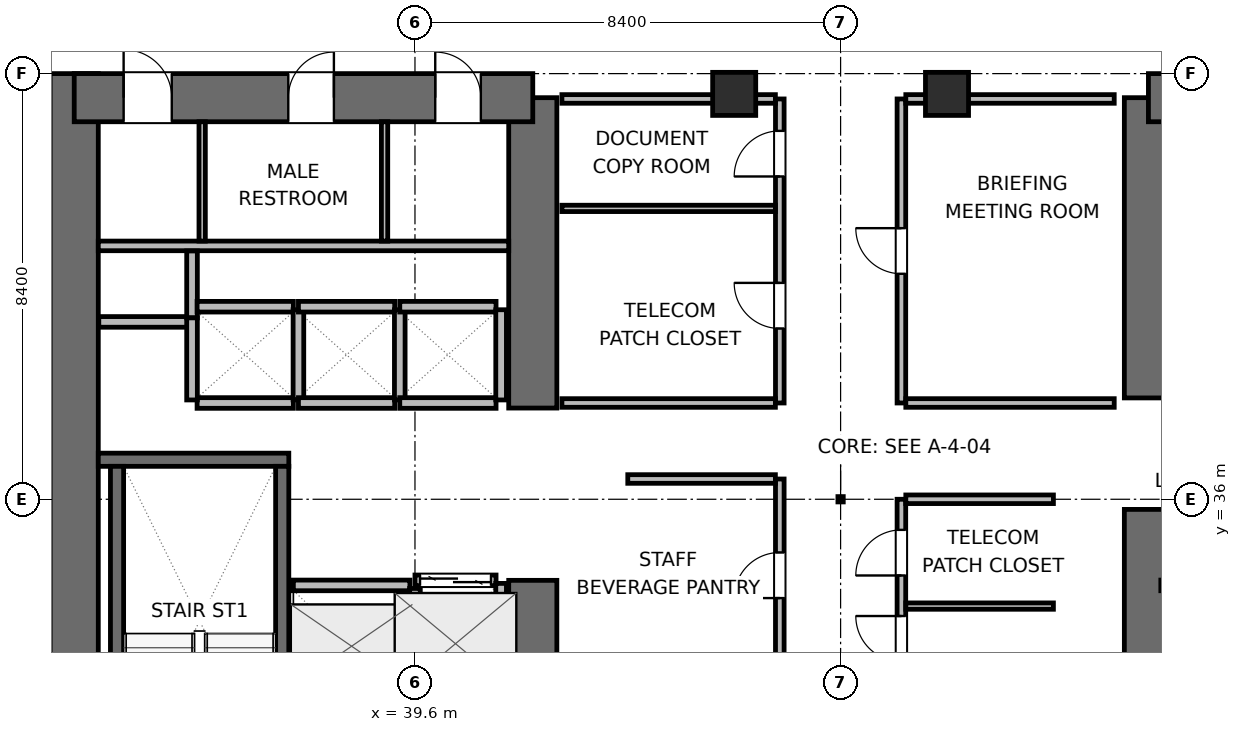
"""IFC4 building model, lengths in metres.
Left out: names, types, materials, properties, quantities, classifications, styles, units other than length and angle.
Written with IfcOpenShell. Run it as: python <this file> out.ifc"""

import sys

from ifc_helpers import new_model, si_unit, direction, frame, frame_2d, origin, origin_2d, place, context, subcontext, project, spatial, rectangle, extrude, element, fill, save


model = new_model("IFC4")
c1 = context("Model", 3, precision=1e-05, world=origin(), true_north=direction((0.0, 1.0)))
c2 = subcontext(c1, "Body", "Model", "MODEL_VIEW")
j1 = project(units=[si_unit("LENGTHUNIT", "METRE"), si_unit("PLANEANGLEUNIT", "RADIAN")], contexts=[c1])
p1 = place(None, origin())
s1 = spatial("IfcSite", under=j1, at=p1, CompositionType="ELEMENT")
p2 = place(p1, origin())
s2 = spatial("IfcBuilding", under=s1, at=p2, CompositionType="ELEMENT")
p3 = place(p2, frame((0.0, 0.0, 25.5)))
s3 = spatial("IfcBuildingStorey", under=s2, at=p3, CompositionType="ELEMENT", Elevation=25.5)
p4 = place(p3, frame((32.875, 27.6, 0.0), z_axis=(0.0, 0.0, 1.0), x_axis=(0.0, 1.0, 0.0)))
e1 = element("IfcWall", 1, at=p4, inside=s3, PredefinedType="SHEAR", context=c2, shape_type="SweptSolid", body=[
    extrude(rectangle(XDim=16.8, YDim=0.95, at=frame_2d((8.4, 0.0))), origin(), (0.0, 0.0, 1.0), 3.9),
])
p5 = place(p3, frame((41.925, 28.075, 0.0), z_axis=(0.0, 0.0, 1.0), x_axis=(0.0, 1.0, 0.0)))
e2 = element("IfcWall", 2, at=p5, inside=s3, PredefinedType="SHEAR", context=c2, shape_type="SweptSolid", body=[
    extrude(rectangle(XDim=6.325, YDim=0.95, at=frame_2d((3.163, 0.0))), origin(), (0.0, 0.0, 1.0), 3.9),
])
p6 = place(p3, frame((41.925, 37.8, 0.0), z_axis=(0.0, 0.0, 1.0), x_axis=(0.0, 1.0, 0.0)))
e3 = element("IfcWall", 3, at=p6, inside=s3, PredefinedType="SHEAR", context=c2, shape_type="SweptSolid", body=[
    extrude(rectangle(XDim=6.125, YDim=0.95, at=frame_2d((3.062, 0.0))), origin(), (0.0, 0.0, 1.0), 3.9),
])
p7 = place(p3, frame((32.875, 43.925, 0.0), z_axis=(0.0, 0.0, 1.0), x_axis=(1.0, 0.0, 0.0)))
e4 = element("IfcWall", 4, at=p7, inside=s3, PredefinedType="SHEAR", context=c2, shape_type="SweptSolid", body=[
    extrude(rectangle(XDim=9.05, YDim=0.95, at=frame_2d((4.525, 0.0))), origin(), (0.0, 0.0, 1.0), 3.9),
])
p8 = place(p7, frame((0.975, 0.0, 0.0)))
e5 = element("IfcOpeningElement", 5, at=p8, cuts=e4, PredefinedType="OPENING", context=c2, shape_type="SweptSolid", body=[
    extrude(rectangle(XDim=0.95, YDim=2.04, at=frame_2d((0.475, 1.02))), frame((0.0, 0.485, 0.0), z_axis=(0.0, -1.0, 0.0), x_axis=(1.0, 0.0, 0.0)), (0.0, 0.0, 1.0), 0.97),
])
p9 = place(p7, frame((4.225, 0.0, 0.0)))
e6 = element("IfcOpeningElement", 6, at=p9, cuts=e4, PredefinedType="OPENING", context=c2, shape_type="SweptSolid", body=[
    extrude(rectangle(XDim=0.9, YDim=2.02, at=frame_2d((0.45, 1.01))), frame((0.0, 0.485, 0.0), z_axis=(0.0, -1.0, 0.0), x_axis=(1.0, 0.0, 0.0)), (0.0, 0.0, 1.0), 0.97),
])
p10 = place(p7, frame((7.125, 0.0, 0.0)))
e7 = element("IfcOpeningElement", 7, at=p10, cuts=e4, PredefinedType="OPENING", context=c2, shape_type="SweptSolid", body=[
    extrude(rectangle(XDim=0.9, YDim=2.02, at=frame_2d((0.45, 1.01))), frame((0.0, 0.485, 0.0), z_axis=(0.0, -1.0, 0.0), x_axis=(1.0, 0.0, 0.0)), (0.0, 0.0, 1.0), 0.97),
])
p11 = place(p3, frame((54.075, 28.075, 0.0), z_axis=(0.0, 0.0, 1.0), x_axis=(0.0, 1.0, 0.0)))
e8 = element("IfcWall", 8, at=p11, inside=s3, PredefinedType="SHEAR", context=c2, shape_type="SweptSolid", body=[
    extrude(rectangle(XDim=7.725, YDim=0.95, at=frame_2d((3.863, 0.0))), origin(), (0.0, 0.0, 1.0), 3.9),
])
p12 = place(p3, frame((54.075, 38.0, 0.0), z_axis=(0.0, 0.0, 1.0), x_axis=(0.0, 1.0, 0.0)))
e9 = element("IfcWall", 9, at=p12, inside=s3, PredefinedType="SHEAR", context=c2, shape_type="SweptSolid", body=[
    extrude(rectangle(XDim=5.925, YDim=0.95, at=frame_2d((2.962, 0.0))), origin(), (0.0, 0.0, 1.0), 3.9),
])
p13 = place(p3, frame((54.075, 43.925, 0.0), z_axis=(0.0, 0.0, 1.0), x_axis=(1.0, 0.0, 0.0)))
e10 = element("IfcWall", 10, at=p13, inside=s3, PredefinedType="SHEAR", context=c2, shape_type="SweptSolid", body=[
    extrude(rectangle(XDim=9.05, YDim=0.95, at=frame_2d((4.525, 0.0))), origin(), (0.0, 0.0, 1.0), 3.9),
])
p14 = place(p3, frame((33.35, 36.78, 0.0), z_axis=(0.0, 0.0, 1.0), x_axis=(1.0, 0.0, 0.0)))
e11 = element("IfcWall", 11, at=p14, inside=s3, PredefinedType="SHEAR", context=c2, shape_type="SweptSolid", body=[
    extrude(rectangle(XDim=3.76, YDim=0.26, at=frame_2d((1.88, 0.0))), origin(), (0.0, 0.0, 1.0), 3.9),
])
p15 = place(p3, frame((33.72, 29.05, 0.0), z_axis=(0.0, 0.0, 1.0), x_axis=(0.0, 1.0, 0.0)))
e12 = element("IfcWall", 12, at=p15, inside=s3, PredefinedType="SHEAR", context=c2, shape_type="SweptSolid", body=[
    extrude(rectangle(XDim=7.6, YDim=0.26, at=frame_2d((3.8, 0.0))), origin(), (0.0, 0.0, 1.0), 3.9),
])
p16 = place(p3, frame((36.98, 29.05, 0.0), z_axis=(0.0, 0.0, 1.0), x_axis=(0.0, 1.0, 0.0)))
e13 = element("IfcWall", 13, at=p16, inside=s3, PredefinedType="SHEAR", context=c2, shape_type="SweptSolid", body=[
    extrude(rectangle(XDim=7.6, YDim=0.26, at=frame_2d((3.8, 0.0))), origin(), (0.0, 0.0, 1.0), 3.9),
])
p17 = place(p16, frame((0.3, 0.0, 0.0)))
e14 = element("IfcOpeningElement", 14, at=p17, cuts=e13, PredefinedType="OPENING", context=c2, shape_type="SweptSolid", body=[
    extrude(rectangle(XDim=1.0, YDim=2.04, at=frame_2d((0.5, 1.02))), frame((0.0, 0.14, 0.0), z_axis=(0.0, -1.0, 0.0), x_axis=(1.0, 0.0, 0.0)), (0.0, 0.0, 1.0), 0.28),
])
for number, where, z_axis, x_axis in (
    (15, (45.9, 44.0, 0.0), (0.0, 0.0, 1.0), (1.0, 0.0, 0.0)),
    (16, (50.1, 44.0, 0.0), (0.0, 0.0, 1.0), (1.0, 0.0, 0.0)),
):
    element("IfcColumn", number, at=place(p3, frame(where, z_axis=z_axis, x_axis=x_axis)), inside=s3, PredefinedType="COLUMN", context=c2, shape_type="SweptSolid", body=[
        extrude(rectangle(XDim=0.85, YDim=0.85, at=origin_2d()), origin(), (0.0, 0.0, 1.0), 3.9),
    ])
p18 = place(p3, frame((33.35, 41.0, 0.0), z_axis=(0.0, 0.0, 1.0), x_axis=(1.0, 0.0, 0.0)))
e17 = element("IfcWall", 17, at=p18, inside=s3, PredefinedType="PLUMBINGWALL", context=c2, shape_type="SweptSolid", body=[
    extrude(rectangle(XDim=8.1, YDim=0.19, at=frame_2d((4.05, 0.0))), origin(), (0.0, 0.0, 1.0), 3.64),
])
for number, where, z_axis, x_axis in (
    (18, (35.4, 41.095, 0.0), (0.0, 0.0, 1.0), (0.0, 1.0, 0.0)),
    (19, (39.0, 41.095, 0.0), (0.0, 0.0, 1.0), (0.0, 1.0, 0.0)),
):
    element("IfcWall", number, at=place(p3, frame(where, z_axis=z_axis, x_axis=x_axis)), inside=s3, PredefinedType="PARTITIONING", context=c2, shape_type="SweptSolid", body=[
        extrude(rectangle(XDim=2.355, YDim=0.125, at=frame_2d((1.177, 0.0))), origin(), (0.0, 0.0, 1.0), 3.64),
    ])
p19 = place(p3, frame((33.36, 39.5, 0.0), z_axis=(0.0, 0.0, 1.0), x_axis=(1.0, 0.0, 0.0)))
e20 = element("IfcWall", 20, at=p19, inside=s3, PredefinedType="PARTITIONING", context=c2, shape_type="SweptSolid", body=[
    extrude(rectangle(XDim=1.86, YDim=0.21, at=frame_2d((0.93, 0.0))), origin(), (0.0, 0.0, 1.0), 3.64),
])
p20 = place(p3, frame((35.2, 39.58, 0.0), z_axis=(0.0, 0.0, 1.0), x_axis=(0.0, 1.0, 0.0)))
e21 = element("IfcWall", 21, at=p20, inside=s3, PredefinedType="PARTITIONING", context=c2, shape_type="SweptSolid", body=[
    extrude(rectangle(XDim=1.32, YDim=0.21, at=frame_2d((0.66, 0.0))), origin(), (0.0, 0.0, 1.0), 3.64),
])
p21 = place(p3, frame((37.2, 34.3, 0.0), z_axis=(0.0, 0.0, 1.0), x_axis=(1.0, 0.0, 0.0)))
e22 = element("IfcWall", 22, at=p21, inside=s3, PredefinedType="PARTITIONING", context=c2, shape_type="SweptSolid", body=[
    extrude(rectangle(XDim=2.3, YDim=0.21, at=frame_2d((1.15, 0.0))), origin(), (0.0, 0.0, 1.0), 3.64),
])
p22 = place(p3, frame((39.6, 31.96, 0.0), z_axis=(0.0, 0.0, 1.0), x_axis=(0.0, 1.0, 0.0)))
e23 = element("IfcWall", 23, at=p22, inside=s3, PredefinedType="PARTITIONING", context=c2, shape_type="SweptSolid", body=[
    extrude(rectangle(XDim=2.28, YDim=0.21, at=frame_2d((1.14, 0.0))), origin(), (0.0, 0.0, 1.0), 3.64),
])
p23 = place(p3, frame((39.6, 34.4, 0.0), z_axis=(0.0, 0.0, 1.0), x_axis=(1.0, 0.0, 0.0)))
e24 = element("IfcWall", 24, at=p23, inside=s3, PredefinedType="PARTITIONING", context=c2, shape_type="SweptSolid", body=[
    extrude(rectangle(XDim=1.6, YDim=0.21, at=frame_2d((0.8, 0.0))), origin(), (0.0, 0.0, 1.0), 3.64),
])
p24 = place(p23, frame((0.1, 0.0, 0.0)))
e25 = element("IfcOpeningElement", 25, at=p24, cuts=e24, PredefinedType="OPENING", context=c2, shape_type="SweptSolid", body=[
    extrude(rectangle(XDim=1.4, YDim=2.06, at=frame_2d((0.7, 1.03))), frame((0.0, 0.115, 0.0), z_axis=(0.0, -1.0, 0.0), x_axis=(1.0, 0.0, 0.0)), (0.0, 0.0, 1.0), 0.23),
])
p25 = place(p3, frame((41.3, 31.96, 0.0), z_axis=(0.0, 0.0, 1.0), x_axis=(0.0, 1.0, 0.0)))
e26 = element("IfcWall", 26, at=p25, inside=s3, PredefinedType="PARTITIONING", context=c2, shape_type="SweptSolid", body=[
    extrude(rectangle(XDim=2.38, YDim=0.21, at=frame_2d((1.19, 0.0))), origin(), (0.0, 0.0, 1.0), 3.64),
])
for number, where, z_axis, x_axis in (
    (27, (35.3, 37.9, 0.0), (0.0, 0.0, 1.0), (1.0, 0.0, 0.0)),
    (28, (35.3, 39.8, 0.0), (0.0, 0.0, 1.0), (1.0, 0.0, 0.0)),
):
    element("IfcWall", number, at=place(p3, frame(where, z_axis=z_axis, x_axis=x_axis)), inside=s3, PredefinedType="PARTITIONING", context=c2, shape_type="SweptSolid", body=[
        extrude(rectangle(XDim=1.9, YDim=0.21, at=frame_2d((0.95, 0.0))), origin(), (0.0, 0.0, 1.0), 3.64),
    ])
p26 = place(p3, frame((35.2, 37.96, 0.0), z_axis=(0.0, 0.0, 1.0), x_axis=(0.0, 1.0, 0.0)))
e29 = element("IfcWall", 29, at=p26, inside=s3, PredefinedType="PARTITIONING", context=c2, shape_type="SweptSolid", body=[
    extrude(rectangle(XDim=1.62, YDim=0.21, at=frame_2d((0.81, 0.0))), origin(), (0.0, 0.0, 1.0), 3.64),
])
p27 = place(p3, frame((37.3, 37.96, 0.0), z_axis=(0.0, 0.0, 1.0), x_axis=(0.0, 1.0, 0.0)))
e30 = element("IfcWall", 30, at=p27, inside=s3, PredefinedType="PARTITIONING", context=c2, shape_type="SweptSolid", body=[
    extrude(rectangle(XDim=1.78, YDim=0.21, at=frame_2d((0.89, 0.0))), origin(), (0.0, 0.0, 1.0), 3.64),
])
for number, where, z_axis, x_axis in (
    (31, (37.3, 37.9, 0.0), (0.0, 0.0, 1.0), (1.0, 0.0, 0.0)),
    (32, (37.3, 39.8, 0.0), (0.0, 0.0, 1.0), (1.0, 0.0, 0.0)),
):
    element("IfcWall", number, at=place(p3, frame(where, z_axis=z_axis, x_axis=x_axis)), inside=s3, PredefinedType="PARTITIONING", context=c2, shape_type="SweptSolid", body=[
        extrude(rectangle(XDim=1.9, YDim=0.21, at=frame_2d((0.95, 0.0))), origin(), (0.0, 0.0, 1.0), 3.64),
    ])
p28 = place(p3, frame((39.3, 37.96, 0.0), z_axis=(0.0, 0.0, 1.0), x_axis=(0.0, 1.0, 0.0)))
e33 = element("IfcWall", 33, at=p28, inside=s3, PredefinedType="PARTITIONING", context=c2, shape_type="SweptSolid", body=[
    extrude(rectangle(XDim=1.78, YDim=0.21, at=frame_2d((0.89, 0.0))), origin(), (0.0, 0.0, 1.0), 3.64),
])
for number, where, z_axis, x_axis in (
    (34, (39.3, 37.9, 0.0), (0.0, 0.0, 1.0), (1.0, 0.0, 0.0)),
    (35, (39.3, 39.8, 0.0), (0.0, 0.0, 1.0), (1.0, 0.0, 0.0)),
):
    element("IfcWall", number, at=place(p3, frame(where, z_axis=z_axis, x_axis=x_axis)), inside=s3, PredefinedType="PARTITIONING", context=c2, shape_type="SweptSolid", body=[
        extrude(rectangle(XDim=1.9, YDim=0.21, at=frame_2d((0.95, 0.0))), origin(), (0.0, 0.0, 1.0), 3.64),
    ])
p29 = place(p3, frame((41.3, 37.96, 0.0), z_axis=(0.0, 0.0, 1.0), x_axis=(0.0, 1.0, 0.0)))
e36 = element("IfcWall", 36, at=p29, inside=s3, PredefinedType="PARTITIONING", context=c2, shape_type="SweptSolid", body=[
    extrude(rectangle(XDim=1.78, YDim=0.21, at=frame_2d((0.89, 0.0))), origin(), (0.0, 0.0, 1.0), 3.64),
])
p30 = place(p3, frame((46.8, 32.6, 0.0), z_axis=(0.0, 0.0, 1.0), x_axis=(0.0, 1.0, 0.0)))
e37 = element("IfcWall", 37, at=p30, inside=s3, PredefinedType="PARTITIONING", context=c2, shape_type="SweptSolid", body=[
    extrude(rectangle(XDim=3.8, YDim=0.17, at=frame_2d((1.9, 0.0))), origin(), (0.0, 0.0, 1.0), 3.64),
])
p31 = place(p30, frame((1.45, 0.0, 0.0)))
e38 = element("IfcOpeningElement", 38, at=p31, cuts=e37, PredefinedType="OPENING", context=c2, shape_type="SweptSolid", body=[
    extrude(rectangle(XDim=0.9, YDim=2.02, at=frame_2d((0.45, 1.01))), frame((0.0, 0.095, 0.0), z_axis=(0.0, -1.0, 0.0), x_axis=(1.0, 0.0, 0.0)), (0.0, 0.0, 1.0), 0.19),
])
p32 = place(p3, frame((43.8, 36.4, 0.0), z_axis=(0.0, 0.0, 1.0), x_axis=(1.0, 0.0, 0.0)))
e39 = element("IfcWall", 39, at=p32, inside=s3, PredefinedType="PARTITIONING", context=c2, shape_type="SweptSolid", body=[
    extrude(rectangle(XDim=2.913, YDim=0.17, at=frame_2d((1.457, 0.0))), origin(), (0.0, 0.0, 1.0), 3.64),
])
p33 = place(p3, frame((49.2, 32.6, 0.0), z_axis=(0.0, 0.0, 1.0), x_axis=(0.0, 1.0, 0.0)))
e40 = element("IfcWall", 40, at=p33, inside=s3, PredefinedType="PARTITIONING", context=c2, shape_type="SweptSolid", body=[
    extrude(rectangle(XDim=3.4, YDim=0.17, at=frame_2d((1.7, 0.0))), origin(), (0.0, 0.0, 1.0), 3.64),
])
p34 = place(p33, frame((0.196, 0.0, 0.0)))
e41 = element("IfcOpeningElement", 41, at=p34, cuts=e40, PredefinedType="OPENING", context=c2, shape_type="SweptSolid", body=[
    extrude(rectangle(XDim=0.9, YDim=2.02, at=frame_2d((0.45, 1.01))), frame((0.0, 0.095, 0.0), z_axis=(0.0, -1.0, 0.0), x_axis=(1.0, 0.0, 0.0)), (0.0, 0.0, 1.0), 0.19),
])
p35 = place(p33, frame((1.896, 0.0, 0.0)))
e42 = element("IfcOpeningElement", 42, at=p35, cuts=e40, PredefinedType="OPENING", context=c2, shape_type="SweptSolid", body=[
    extrude(rectangle(XDim=0.9, YDim=2.02, at=frame_2d((0.45, 1.01))), frame((0.0, 0.095, 0.0), z_axis=(0.0, -1.0, 0.0), x_axis=(1.0, 0.0, 0.0)), (0.0, 0.0, 1.0), 0.19),
])
p36 = place(p3, frame((49.287, 36.0, 0.0), z_axis=(0.0, 0.0, 1.0), x_axis=(1.0, 0.0, 0.0)))
e43 = element("IfcWall", 43, at=p36, inside=s3, PredefinedType="PARTITIONING", context=c2, shape_type="SweptSolid", body=[
    extrude(rectangle(XDim=2.913, YDim=0.17, at=frame_2d((1.457, 0.0))), origin(), (0.0, 0.0, 1.0), 3.64),
])
p37 = place(p3, frame((49.287, 33.892, 0.0), z_axis=(0.0, 0.0, 1.0), x_axis=(1.0, 0.0, 0.0)))
e44 = element("IfcWall", 44, at=p37, inside=s3, PredefinedType="PARTITIONING", context=c2, shape_type="SweptSolid", body=[
    extrude(rectangle(XDim=2.913, YDim=0.125, at=frame_2d((1.457, 0.0))), origin(), (0.0, 0.0, 1.0), 3.64),
])
p38 = place(p3, frame((46.8, 37.9, 0.0), z_axis=(0.0, 0.0, 1.0), x_axis=(0.0, 1.0, 0.0)))
e45 = element("IfcWall", 45, at=p38, inside=s3, PredefinedType="PARTITIONING", context=c2, shape_type="SweptSolid", body=[
    extrude(rectangle(XDim=6.0, YDim=0.17, at=frame_2d((3.0, 0.0))), origin(), (0.0, 0.0, 1.0), 3.64),
])
p39 = place(p38, frame((1.47, 0.0, 0.0)))
e46 = element("IfcOpeningElement", 46, at=p39, cuts=e45, PredefinedType="OPENING", context=c2, shape_type="SweptSolid", body=[
    extrude(rectangle(XDim=0.9, YDim=2.02, at=frame_2d((0.45, 1.01))), frame((0.0, 0.095, 0.0), z_axis=(0.0, -1.0, 0.0), x_axis=(1.0, 0.0, 0.0)), (0.0, 0.0, 1.0), 0.19),
])
p40 = place(p38, frame((4.47, 0.0, 0.0)))
e47 = element("IfcOpeningElement", 47, at=p40, cuts=e45, PredefinedType="OPENING", context=c2, shape_type="SweptSolid", body=[
    extrude(rectangle(XDim=0.9, YDim=2.02, at=frame_2d((0.45, 1.01))), frame((0.0, 0.095, 0.0), z_axis=(0.0, -1.0, 0.0), x_axis=(1.0, 0.0, 0.0)), (0.0, 0.0, 1.0), 0.19),
])
p41 = place(p3, frame((42.5, 37.9, 0.0), z_axis=(0.0, 0.0, 1.0), x_axis=(1.0, 0.0, 0.0)))
e48 = element("IfcWall", 48, at=p41, inside=s3, PredefinedType="PARTITIONING", context=c2, shape_type="SweptSolid", body=[
    extrude(rectangle(XDim=4.213, YDim=0.17, at=frame_2d((2.106, 0.0))), origin(), (0.0, 0.0, 1.0), 3.64),
])
p42 = place(p3, frame((42.5, 43.9, 0.0), z_axis=(0.0, 0.0, 1.0), x_axis=(1.0, 0.0, 0.0)))
e49 = element("IfcWall", 49, at=p42, inside=s3, PredefinedType="PARTITIONING", context=c2, shape_type="SweptSolid", body=[
    extrude(rectangle(XDim=4.213, YDim=0.17, at=frame_2d((2.106, 0.0))), origin(), (0.0, 0.0, 1.0), 2.525),
])
p43 = place(p3, frame((42.5, 41.74, 0.0), z_axis=(0.0, 0.0, 1.0), x_axis=(1.0, 0.0, 0.0)))
e50 = element("IfcWall", 50, at=p43, inside=s3, PredefinedType="PARTITIONING", context=c2, shape_type="SweptSolid", body=[
    extrude(rectangle(XDim=4.213, YDim=0.125, at=frame_2d((2.106, 0.0))), origin(), (0.0, 0.0, 1.0), 3.64),
])
p44 = place(p3, frame((49.2, 37.9, 0.0), z_axis=(0.0, 0.0, 1.0), x_axis=(0.0, 1.0, 0.0)))
e51 = element("IfcWall", 51, at=p44, inside=s3, PredefinedType="PARTITIONING", context=c2, shape_type="SweptSolid", body=[
    extrude(rectangle(XDim=6.0, YDim=0.17, at=frame_2d((3.0, 0.0))), origin(), (0.0, 0.0, 1.0), 3.64),
])
p45 = place(p44, frame((2.55, 0.0, 0.0)))
e52 = element("IfcOpeningElement", 52, at=p45, cuts=e51, PredefinedType="OPENING", context=c2, shape_type="SweptSolid", body=[
    extrude(rectangle(XDim=0.9, YDim=2.02, at=frame_2d((0.45, 1.01))), frame((0.0, 0.095, 0.0), z_axis=(0.0, -1.0, 0.0), x_axis=(1.0, 0.0, 0.0)), (0.0, 0.0, 1.0), 0.19),
])
p46 = place(p3, frame((49.287, 37.9, 0.0), z_axis=(0.0, 0.0, 1.0), x_axis=(1.0, 0.0, 0.0)))
e53 = element("IfcWall", 53, at=p46, inside=s3, PredefinedType="PARTITIONING", context=c2, shape_type="SweptSolid", body=[
    extrude(rectangle(XDim=4.113, YDim=0.17, at=frame_2d((2.056, 0.0))), origin(), (0.0, 0.0, 1.0), 3.64),
])
p47 = place(p3, frame((49.287, 43.9, 0.0), z_axis=(0.0, 0.0, 1.0), x_axis=(1.0, 0.0, 0.0)))
e54 = element("IfcWall", 54, at=p47, inside=s3, PredefinedType="PARTITIONING", context=c2, shape_type="SweptSolid", body=[
    extrude(rectangle(XDim=4.113, YDim=0.17, at=frame_2d((2.056, 0.0))), origin(), (0.0, 0.0, 1.0), 2.525),
])
p48 = place(p24, origin())
e55 = element("IfcDoor", 55, at=p48, inside=s3, OperationType="DOUBLE_DOOR_SLIDING", PredefinedType="DOOR", context=c2, shape_type="SweptSolid", body=[
    extrude(rectangle(XDim=1.4, YDim=2.06, at=frame_2d((0.7, 1.03))), frame((0.0, 0.025, 0.0), z_axis=(0.0, -1.0, 0.0), x_axis=(1.0, 0.0, 0.0)), (0.0, 0.0, 1.0), 0.05),
])
fill(e25, e55)
p49 = place(p8, origin())
e56 = element("IfcDoor", 56, at=p49, inside=s3, OperationType="SINGLE_SWING_LEFT", PredefinedType="DOOR", context=c2, shape_type="SweptSolid", body=[
    extrude(rectangle(XDim=0.95, YDim=2.04, at=frame_2d((0.475, 1.02))), frame((0.0, 0.025, 0.0), z_axis=(0.0, -1.0, 0.0), x_axis=(1.0, 0.0, 0.0)), (0.0, 0.0, 1.0), 0.05),
])
fill(e5, e56)
p50 = place(p9, origin())
e57 = element("IfcDoor", 57, at=p50, inside=s3, OperationType="SINGLE_SWING_RIGHT", PredefinedType="DOOR", context=c2, shape_type="SweptSolid", body=[
    extrude(rectangle(XDim=0.9, YDim=2.02, at=frame_2d((0.45, 1.01))), frame((0.0, 0.025, 0.0), z_axis=(0.0, -1.0, 0.0), x_axis=(1.0, 0.0, 0.0)), (0.0, 0.0, 1.0), 0.05),
])
fill(e6, e57)
p51 = place(p10, origin())
e58 = element("IfcDoor", 58, at=p51, inside=s3, OperationType="SINGLE_SWING_LEFT", PredefinedType="DOOR", context=c2, shape_type="SweptSolid", body=[
    extrude(rectangle(XDim=0.9, YDim=2.02, at=frame_2d((0.45, 1.01))), frame((0.0, 0.025, 0.0), z_axis=(0.0, -1.0, 0.0), x_axis=(1.0, 0.0, 0.0)), (0.0, 0.0, 1.0), 0.05),
])
fill(e7, e58)
p52 = place(p31, origin())
e59 = element("IfcDoor", 59, at=p52, inside=s3, OperationType="SINGLE_SWING_LEFT", PredefinedType="DOOR", context=c2, shape_type="SweptSolid", body=[
    extrude(rectangle(XDim=0.9, YDim=2.02, at=frame_2d((0.45, 1.01))), frame((0.0, 0.025, 0.0), z_axis=(0.0, -1.0, 0.0), x_axis=(1.0, 0.0, 0.0)), (0.0, 0.0, 1.0), 0.05),
])
fill(e38, e59)
p53 = place(p34, origin())
e60 = element("IfcDoor", 60, at=p53, inside=s3, OperationType="SINGLE_SWING_RIGHT", PredefinedType="DOOR", context=c2, shape_type="SweptSolid", body=[
    extrude(rectangle(XDim=0.9, YDim=2.02, at=frame_2d((0.45, 1.01))), frame((0.0, 0.025, 0.0), z_axis=(0.0, -1.0, 0.0), x_axis=(1.0, 0.0, 0.0)), (0.0, 0.0, 1.0), 0.05),
])
fill(e41, e60)
p54 = place(p35, origin())
e61 = element("IfcDoor", 61, at=p54, inside=s3, OperationType="SINGLE_SWING_LEFT", PredefinedType="DOOR", context=c2, shape_type="SweptSolid", body=[
    extrude(rectangle(XDim=0.9, YDim=2.02, at=frame_2d((0.45, 1.01))), frame((0.0, 0.025, 0.0), z_axis=(0.0, -1.0, 0.0), x_axis=(1.0, 0.0, 0.0)), (0.0, 0.0, 1.0), 0.05),
])
fill(e42, e61)
p55 = place(p39, origin())
e62 = element("IfcDoor", 62, at=p55, inside=s3, OperationType="SINGLE_SWING_RIGHT", PredefinedType="DOOR", context=c2, shape_type="SweptSolid", body=[
    extrude(rectangle(XDim=0.9, YDim=2.02, at=frame_2d((0.45, 1.01))), frame((0.0, 0.025, 0.0), z_axis=(0.0, -1.0, 0.0), x_axis=(1.0, 0.0, 0.0)), (0.0, 0.0, 1.0), 0.05),
])
fill(e46, e62)
p56 = place(p40, origin())
e63 = element("IfcDoor", 63, at=p56, inside=s3, OperationType="SINGLE_SWING_LEFT", PredefinedType="DOOR", context=c2, shape_type="SweptSolid", body=[
    extrude(rectangle(XDim=0.9, YDim=2.02, at=frame_2d((0.45, 1.01))), frame((0.0, 0.025, 0.0), z_axis=(0.0, -1.0, 0.0), x_axis=(1.0, 0.0, 0.0)), (0.0, 0.0, 1.0), 0.05),
])
fill(e47, e63)
p57 = place(p45, origin())
e64 = element("IfcDoor", 64, at=p57, inside=s3, OperationType="SINGLE_SWING_RIGHT", PredefinedType="DOOR", context=c2, shape_type="SweptSolid", body=[
    extrude(rectangle(XDim=0.9, YDim=2.02, at=frame_2d((0.45, 1.01))), frame((0.0, 0.025, 0.0), z_axis=(0.0, -1.0, 0.0), x_axis=(1.0, 0.0, 0.0)), (0.0, 0.0, 1.0), 0.05),
])
fill(e52, e64)
save(model, sys.argv[1])
